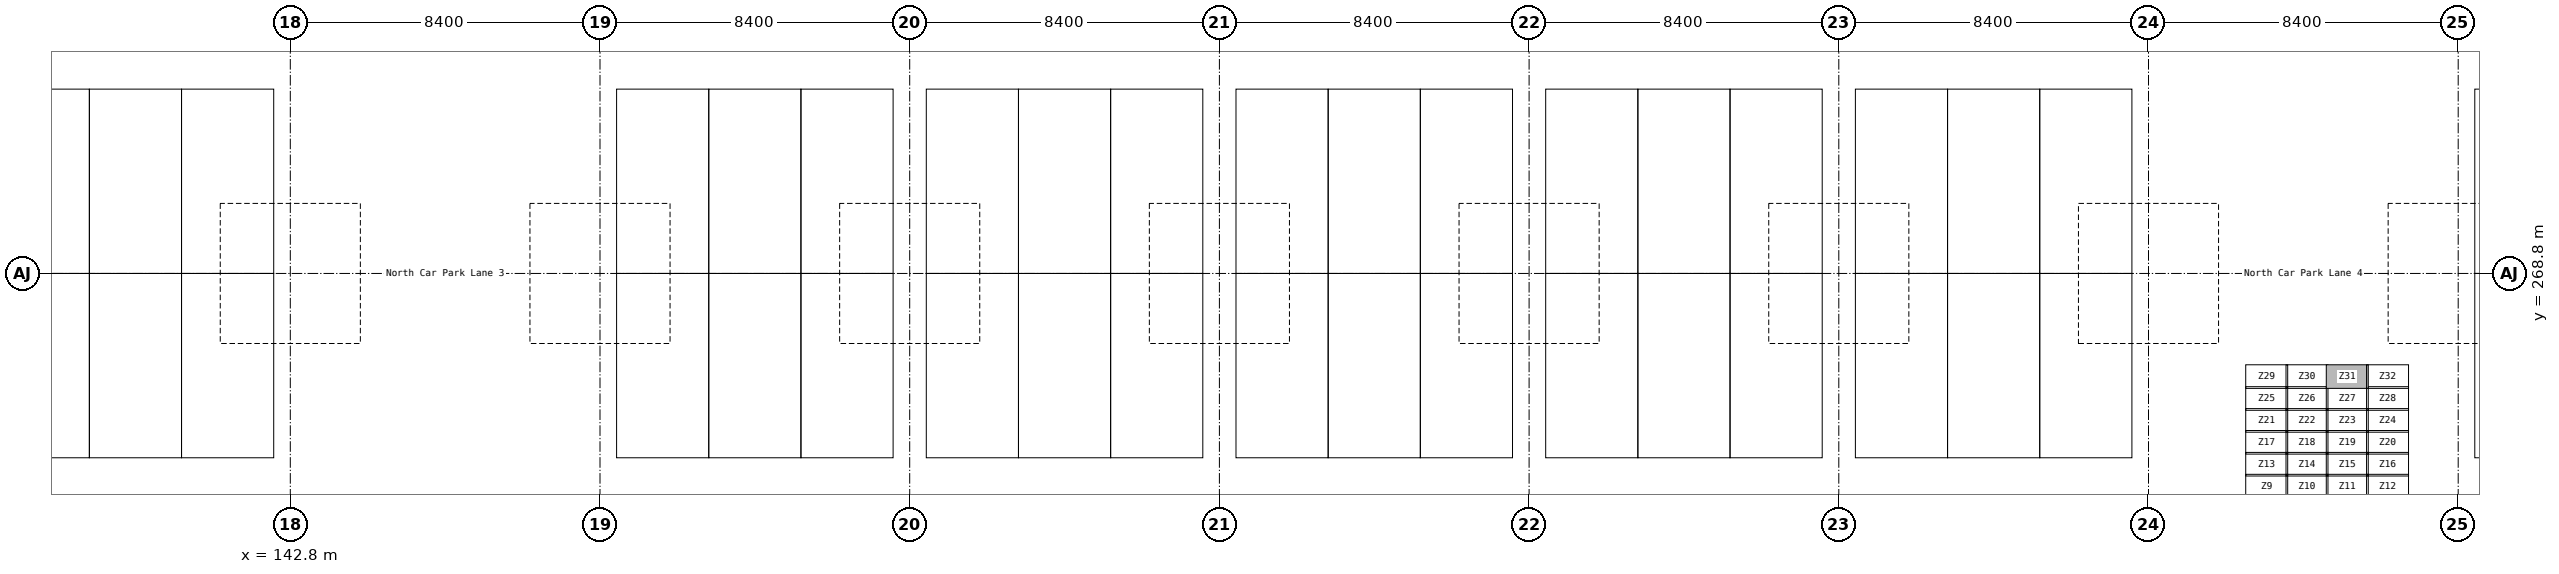
"""IFC4 building model, lengths in metres.
Left out: names, types, materials, properties, quantities, classifications, styles, units other than length and angle.
Written with IfcOpenShell. Run it as: python <this file> out.ifc"""

import sys

from ifc_helpers import new_model, si_unit, direction, frame, origin, origin_2d, place, context, subcontext, project, spatial, rectangle, extrude, element, save


model = new_model("IFC4")
c1 = context("Model", 3, precision=1e-05, world=origin(), true_north=direction((0.0, 1.0)))
c2 = subcontext(c1, "Body", "Model", "MODEL_VIEW")
j1 = project(units=[si_unit("LENGTHUNIT", "METRE"), si_unit("PLANEANGLEUNIT", "RADIAN")], contexts=[c1])
p1 = place(None, origin())
s1 = spatial("IfcSite", under=j1, at=p1, CompositionType="ELEMENT")
p2 = place(p1, origin())
s2 = spatial("IfcBuilding", under=s1, at=p2, CompositionType="ELEMENT")
p3 = place(p2, frame((0.0, 0.0, -3.0)))
s3 = spatial("IfcBuildingStorey", under=s2, at=p3, CompositionType="ELEMENT", Elevation=-3.0)
for number, where, z_axis, x_axis in (
    (1, (142.8, 268.8, 0.0), (0.0, 0.0, 1.0), (1.0, 0.0, 0.0)),
    (2, (151.2, 268.8, 0.0), (0.0, 0.0, 1.0), (1.0, 0.0, 0.0)),
    (3, (159.6, 268.8, 0.0), (0.0, 0.0, 1.0), (1.0, 0.0, 0.0)),
    (4, (168.0, 268.8, 0.0), (0.0, 0.0, 1.0), (1.0, 0.0, 0.0)),
    (5, (176.4, 268.8, 0.0), (0.0, 0.0, 1.0), (1.0, 0.0, 0.0)),
    (6, (184.8, 268.8, 0.0), (0.0, 0.0, 1.0), (1.0, 0.0, 0.0)),
    (7, (193.2, 268.8, 0.0), (0.0, 0.0, 1.0), (1.0, 0.0, 0.0)),
    (8, (201.6, 268.8, 0.0), (0.0, 0.0, 1.0), (1.0, 0.0, 0.0)),
):
    element("IfcColumn", number, at=place(p3, frame(where, z_axis=z_axis, x_axis=x_axis)), inside=s3, PredefinedType="COLUMN", context=c2, shape_type="SweptSolid", body=[
        extrude(rectangle(XDim=0.8, YDim=0.8, at=origin_2d()), origin(), (0.0, 0.0, 1.0), 2.4),
    ])
save(model, sys.argv[1])
